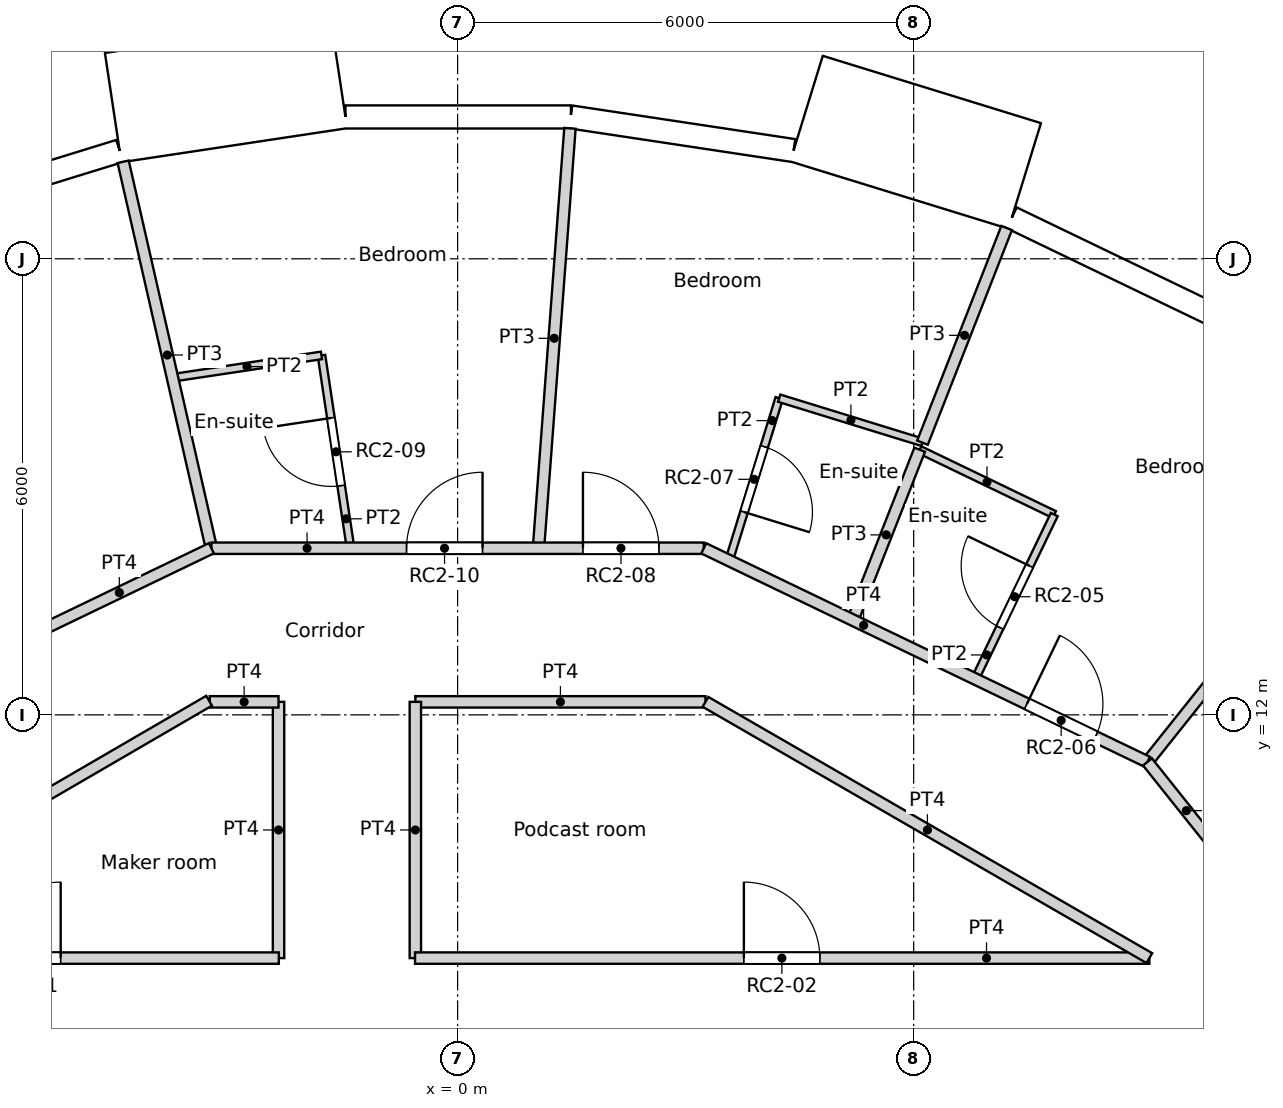
"""IFC4 building model, lengths in metres.
Left out: names, types, materials, properties, quantities, classifications, styles, units other than length and angle.
Written with IfcOpenShell. Run it as: python <this file> out.ifc"""

import sys

from ifc_helpers import new_model, si_unit, direction, frame, frame_2d, origin, origin_2d, place, context, subcontext, project, spatial, rectangle, circle, extrude, element, fill, save


model = new_model("IFC4")
c1 = context("Model", 3, precision=1e-05, world=origin(), true_north=direction((0.0, 1.0)))
c2 = subcontext(c1, "Body", "Model", "MODEL_VIEW")
j1 = project(units=[si_unit("LENGTHUNIT", "METRE"), si_unit("PLANEANGLEUNIT", "RADIAN")], contexts=[c1])
p1 = place(None, origin())
s1 = spatial("IfcSite", under=j1, at=p1, CompositionType="ELEMENT")
p2 = place(p1, origin())
s2 = spatial("IfcBuilding", under=s1, at=p2, CompositionType="ELEMENT")
p3 = place(p2, frame((0.0, 0.0, 241.8)))
s3 = spatial("IfcBuildingStorey", under=s2, at=p3, CompositionType="ELEMENT", Elevation=241.8)
for number, where, z_axis, x_axis in (
    (1, (6.876, 17.521, 0.0), (0.0, 0.0, 1.0), (1.0, 0.0, 0.0)),
    (2, (1.406, 18.77, 0.0), (0.0, 0.0, 1.0), (1.0, 0.0, 0.0)),
    (3, (-4.188, 18.35, 0.0), (0.0, 0.0, 1.0), (1.0, 0.0, 0.0)),
):
    element("IfcColumn", number, at=place(p3, frame(where, z_axis=z_axis, x_axis=x_axis)), inside=s3, PredefinedType="COLUMN", context=c2, shape_type="SweptSolid", body=[
        extrude(circle(Radius=0.55, at=origin_2d()), origin(), (0.0, 0.0, 1.0), 3.6),
    ])
p4 = place(p3, frame((9.961, 17.253, 0.0), z_axis=(0.0, 0.0, 1.0), x_axis=(-0.90095513435, 0.433912255978, 0.0)))
e4 = element("IfcWall", 4, at=p4, inside=s3, PredefinedType="SOLIDWALL", context=c2, shape_type="SweptSolid", body=[
    extrude(rectangle(XDim=2.962, YDim=0.3, at=frame_2d((1.481, 0.0))), origin(), (0.0, 0.0, 1.0), 3.25),
])
p5 = place(p4, frame((1.481, 0.0, 1.55)))
e5 = element("IfcOpeningElement", 5, at=p5, cuts=e4, PredefinedType="OPENING", context=c2, shape_type="SweptSolid", body=[
    extrude(circle(Radius=0.9, at=origin_2d()), frame((0.0, 0.16, 0.0), z_axis=(0.0, -1.0, 0.0), x_axis=(1.0, 0.0, 0.0)), (0.0, 0.0, 1.0), 0.32),
])
p6 = place(p3, frame((7.458, 19.091, -0.35), z_axis=(0.0, 0.0, 1.0), x_axis=(-0.955571139978, 0.294760574774, 0.0)))
e6 = element("IfcWall", 6, at=p6, inside=s3, PredefinedType="ELEMENTEDWALL", context=c2, shape_type="SweptSolid", body=[
    extrude(rectangle(XDim=3.0, YDim=1.45, at=frame_2d((1.5, 0.0))), origin(), (0.0, 0.0, 1.0), 3.6),
])
p7 = place(p6, frame((1.5, 0.0, 1.9)))
e7 = element("IfcOpeningElement", 7, at=p7, cuts=e6, PredefinedType="OPENING", context=c2, shape_type="SweptSolid", body=[
    extrude(circle(Radius=0.9, at=origin_2d()), frame((0.0, 0.735, 0.0), z_axis=(0.0, -1.0, 0.0), x_axis=(1.0, 0.0, 0.0)), (0.0, 0.0, 1.0), 1.47),
])
p8 = place(p3, frame((4.418, 19.425, 0.0), z_axis=(0.0, 0.0, 1.0), x_axis=(-0.988835775663, 0.149009425104, 0.0)))
e8 = element("IfcWall", 8, at=p8, inside=s3, PredefinedType="SOLIDWALL", context=c2, shape_type="SweptSolid", body=[
    extrude(rectangle(XDim=2.962, YDim=0.3, at=frame_2d((1.481, 0.0))), origin(), (0.0, 0.0, 1.0), 3.25),
])
p9 = place(p8, frame((1.481, 0.0, 1.55)))
e9 = element("IfcOpeningElement", 9, at=p9, cuts=e8, PredefinedType="OPENING", context=c2, shape_type="SweptSolid", body=[
    extrude(circle(Radius=0.9, at=origin_2d()), frame((0.0, 0.16, 0.0), z_axis=(0.0, -1.0, 0.0), x_axis=(1.0, 0.0, 0.0)), (0.0, 0.0, 1.0), 0.32),
])
p10 = place(p3, frame((1.489, 19.866, 0.0), z_axis=(0.0, 0.0, 1.0), x_axis=(-1.0, 0.0, 0.0)))
e10 = element("IfcWall", 10, at=p10, inside=s3, PredefinedType="SOLIDWALL", context=c2, shape_type="SweptSolid", body=[
    extrude(rectangle(XDim=2.962, YDim=0.3, at=frame_2d((1.481, 0.0))), origin(), (0.0, 0.0, 1.0), 3.25),
])
p11 = place(p10, frame((1.481, 0.0, 1.55)))
e11 = element("IfcOpeningElement", 11, at=p11, cuts=e10, PredefinedType="OPENING", context=c2, shape_type="SweptSolid", body=[
    extrude(circle(Radius=0.9, at=origin_2d()), frame((0.0, 0.16, 0.0), z_axis=(0.0, -1.0, 0.0), x_axis=(1.0, 0.0, 0.0)), (0.0, 0.0, 1.0), 0.32),
])
p12 = place(p3, frame((-1.563, 20.436, -0.35), z_axis=(0.0, 0.0, 1.0), x_axis=(-0.988836445254, -0.149004981587, 0.0)))
e12 = element("IfcWall", 12, at=p12, inside=s3, PredefinedType="ELEMENTEDWALL", context=c2, shape_type="SweptSolid", body=[
    extrude(rectangle(XDim=3.0, YDim=1.45, at=frame_2d((1.5, 0.0))), origin(), (0.0, 0.0, 1.0), 3.6),
])
p13 = place(p12, frame((1.5, 0.0, 1.9)))
e13 = element("IfcOpeningElement", 13, at=p13, cuts=e12, PredefinedType="OPENING", context=c2, shape_type="SweptSolid", body=[
    extrude(circle(Radius=0.9, at=origin_2d()), frame((0.0, 0.735, 0.0), z_axis=(0.0, -1.0, 0.0), x_axis=(1.0, 0.0, 0.0)), (0.0, 0.0, 1.0), 1.47),
])
p14 = place(p3, frame((-4.448, 19.418, 0.0), z_axis=(0.0, 0.0, 1.0), x_axis=(-0.95558635705, -0.294711238707, 0.0)))
e14 = element("IfcWall", 14, at=p14, inside=s3, PredefinedType="SOLIDWALL", context=c2, shape_type="SweptSolid", body=[
    extrude(rectangle(XDim=2.962, YDim=0.3, at=frame_2d((1.481, 0.0))), origin(), (0.0, 0.0, 1.0), 3.25),
])
p15 = place(p14, frame((1.481, 0.0, 1.55)))
e15 = element("IfcOpeningElement", 15, at=p15, cuts=e14, PredefinedType="OPENING", context=c2, shape_type="SweptSolid", body=[
    extrude(circle(Radius=0.9, at=origin_2d()), frame((0.0, 0.16, 0.0), z_axis=(0.0, -1.0, 0.0), x_axis=(1.0, 0.0, 0.0)), (0.0, 0.0, 1.0), 0.32),
])
p16 = place(p3, frame((-9.092, 8.8, 0.0), z_axis=(0.0, 0.0, 1.0), x_axis=(0.864470922103, 0.502682827277, 0.0)))
e16 = element("IfcWall", 16, at=p16, inside=s3, PredefinedType="PARTITIONING", context=c2, shape_type="SweptSolid", body=[
    extrude(rectangle(XDim=6.735, YDim=0.15, at=frame_2d((3.368, 0.0))), origin(), (0.0, 0.0, 1.0), 3.25),
])
p17 = place(p3, frame((-9.092, 8.8, 0.0), z_axis=(0.0, 0.0, 1.0), x_axis=(1.0, 0.0, 0.0)))
e17 = element("IfcWall", 17, at=p17, inside=s3, PredefinedType="PARTITIONING", context=c2, shape_type="SweptSolid", body=[
    extrude(rectangle(XDim=6.74, YDim=0.15, at=frame_2d((3.37, 0.0))), origin(), (0.0, 0.0, 1.0), 3.25),
])
p18 = place(p17, frame((2.87, 0.0, 0.0)))
e18 = element("IfcOpeningElement", 18, at=p18, cuts=e17, PredefinedType="OPENING", context=c2, shape_type="SweptSolid", body=[
    extrude(rectangle(XDim=1.0, YDim=2.04, at=frame_2d((0.5, 1.02))), frame((0.0, 0.075, 0.0), z_axis=(0.0, -1.0, 0.0), x_axis=(1.0, 0.0, 0.0)), (0.0, 0.0, 1.0), 0.15),
])
p19 = place(p3, frame((-0.56, 8.8, 0.0), z_axis=(0.0, 0.0, 1.0), x_axis=(1.0, 0.0, 0.0)))
e19 = element("IfcWall", 19, at=p19, inside=s3, PredefinedType="PARTITIONING", context=c2, shape_type="SweptSolid", body=[
    extrude(rectangle(XDim=9.661, YDim=0.15, at=frame_2d((4.83, 0.0))), origin(), (0.0, 0.0, 1.0), 3.25),
])
p20 = place(p19, frame((4.326, 0.0, 0.0)))
e20 = element("IfcOpeningElement", 20, at=p20, cuts=e19, PredefinedType="OPENING", context=c2, shape_type="SweptSolid", body=[
    extrude(rectangle(XDim=1.0, YDim=2.04, at=frame_2d((0.5, 1.02))), frame((0.0, 0.075, 0.0), z_axis=(0.0, -1.0, 0.0), x_axis=(1.0, 0.0, 0.0)), (0.0, 0.0, 1.0), 0.15),
])
p21 = place(p3, frame((-2.356, 8.8, 0.0), z_axis=(0.0, 0.0, 1.0), x_axis=(0.0, 1.0, 0.0)))
e21 = element("IfcWall", 21, at=p21, inside=s3, PredefinedType="PARTITIONING", context=c2, shape_type="SweptSolid", body=[
    extrude(rectangle(XDim=3.371, YDim=0.15, at=frame_2d((1.686, 0.0))), origin(), (0.0, 0.0, 1.0), 3.25),
])
p22 = place(p3, frame((-3.261, 12.171, 0.0), z_axis=(0.0, 0.0, 1.0), x_axis=(1.0, 0.0, 0.0)))
e22 = element("IfcWall", 22, at=p22, inside=s3, PredefinedType="PARTITIONING", context=c2, shape_type="SweptSolid", body=[
    extrude(rectangle(XDim=0.905, YDim=0.15, at=frame_2d((0.453, 0.0))), origin(), (0.0, 0.0, 1.0), 3.25),
])
p23 = place(p3, frame((3.261, 12.171, 0.0), z_axis=(0.0, 0.0, 1.0), x_axis=(0.866066809554, -0.499928276245, 0.0)))
e23 = element("IfcWall", 23, at=p23, inside=s3, PredefinedType="PARTITIONING", context=c2, shape_type="SweptSolid", body=[
    extrude(rectangle(XDim=6.743, YDim=0.15, at=frame_2d((3.371, 0.0))), origin(), (0.0, 0.0, 1.0), 3.25),
])
p24 = place(p3, frame((-0.556, 12.171, 0.0), z_axis=(0.0, 0.0, 1.0), x_axis=(1.0, 0.0, 0.0)))
e24 = element("IfcWall", 24, at=p24, inside=s3, PredefinedType="PARTITIONING", context=c2, shape_type="SweptSolid", body=[
    extrude(rectangle(XDim=3.817, YDim=0.15, at=frame_2d((1.908, 0.0))), origin(), (0.0, 0.0, 1.0), 3.25),
])
p25 = place(p3, frame((-0.556, 8.8, 0.0), z_axis=(0.0, 0.0, 1.0), x_axis=(0.0, 1.0, 0.0)))
e25 = element("IfcWall", 25, at=p25, inside=s3, PredefinedType="PARTITIONING", context=c2, shape_type="SweptSolid", body=[
    extrude(rectangle(XDim=3.371, YDim=0.15, at=frame_2d((1.686, 0.0))), origin(), (0.0, 0.0, 1.0), 3.25),
])
p26 = place(p3, frame((9.076, 11.381, 0.0), z_axis=(0.0, 0.0, 1.0), x_axis=(0.623805208652, -0.781579849829, 0.0)))
e26 = element("IfcWall", 26, at=p26, inside=s3, PredefinedType="PARTITIONING", context=c2, shape_type="SweptSolid", body=[
    extrude(rectangle(XDim=1.64, YDim=0.15, at=frame_2d((0.82, 0.0))), origin(), (0.0, 0.0, 1.0), 3.25),
])
p27 = place(p3, frame((3.238, 14.191, 0.0), z_axis=(0.0, 0.0, 1.0), x_axis=(0.901070942113, -0.433671716024, 0.0)))
e27 = element("IfcWall", 27, at=p27, inside=s3, PredefinedType="PARTITIONING", context=c2, shape_type="SweptSolid", body=[
    extrude(rectangle(XDim=6.479, YDim=0.15, at=frame_2d((3.239, 0.0))), origin(), (0.0, 0.0, 1.0), 3.25),
])
p28 = place(p27, frame((4.718, 0.0, 0.0)))
e28 = element("IfcOpeningElement", 28, at=p28, cuts=e27, PredefinedType="OPENING", context=c2, shape_type="SweptSolid", body=[
    extrude(rectangle(XDim=1.0, YDim=2.1, at=frame_2d((0.5, 1.05))), frame((0.0, 0.075, 0.0), z_axis=(0.0, -1.0, 0.0), x_axis=(1.0, 0.0, 0.0)), (0.0, 0.0, 1.0), 0.15),
])
p29 = place(p3, frame((-3.239, 14.192, 0.0), z_axis=(0.0, 0.0, 1.0), x_axis=(1.0, 0.0, 0.0)))
e29 = element("IfcWall", 29, at=p29, inside=s3, PredefinedType="PARTITIONING", context=c2, shape_type="SweptSolid", body=[
    extrude(rectangle(XDim=6.478, YDim=0.15, at=frame_2d((3.239, 0.0))), origin(), (0.0, 0.0, 1.0), 3.25),
])
p30 = place(p29, frame((4.888, 0.0, 0.0)))
e30 = element("IfcOpeningElement", 30, at=p30, cuts=e29, PredefinedType="OPENING", context=c2, shape_type="SweptSolid", body=[
    extrude(rectangle(XDim=1.0, YDim=2.1, at=frame_2d((0.5, 1.05))), frame((0.0, 0.075, 0.0), z_axis=(0.0, -1.0, 0.0), x_axis=(1.0, 0.0, 0.0)), (0.0, 0.0, 1.0), 0.15),
])
p31 = place(p29, frame((2.567, 0.0, 0.0)))
e31 = element("IfcOpeningElement", 31, at=p31, cuts=e29, PredefinedType="OPENING", context=c2, shape_type="SweptSolid", body=[
    extrude(rectangle(XDim=1.0, YDim=2.1, at=frame_2d((0.5, 1.05))), frame((0.0, 0.075, 0.0), z_axis=(0.0, -1.0, 0.0), x_axis=(1.0, 0.0, 0.0)), (0.0, 0.0, 1.0), 0.15),
])
p32 = place(p3, frame((-9.076, 11.381, 0.0), z_axis=(0.0, 0.0, 1.0), x_axis=(0.900976027191, 0.433868872388, 0.0)))
e32 = element("IfcWall", 32, at=p32, inside=s3, PredefinedType="PARTITIONING", context=c2, shape_type="SweptSolid", body=[
    extrude(rectangle(XDim=6.479, YDim=0.15, at=frame_2d((3.239, 0.0))), origin(), (0.0, 0.0, 1.0), 3.25),
])
p33 = place(p32, frame((2.739, 0.0, 0.0)))
e33 = element("IfcOpeningElement", 33, at=p33, cuts=e32, PredefinedType="OPENING", context=c2, shape_type="SweptSolid", body=[
    extrude(rectangle(XDim=1.0, YDim=2.04, at=frame_2d((0.5, 1.02))), frame((0.0, 0.075, 0.0), z_axis=(0.0, -1.0, 0.0), x_axis=(1.0, 0.0, 0.0)), (0.0, 0.0, 1.0), 0.15),
])
p34 = place(p3, frame((9.076, 11.381, 0.0), z_axis=(0.0, 0.0, 1.0), x_axis=(0.623460949534, 0.781854490558, 0.0)))
e34 = element("IfcWall", 34, at=p34, inside=s3, PredefinedType="PARTITIONING", context=c2, shape_type="SweptSolid", body=[
    extrude(rectangle(XDim=5.214, YDim=0.15, at=frame_2d((2.607, 0.0))), origin(), (0.0, 0.0, 1.0), 3.25),
])
p35 = place(p3, frame((6.809, 12.473, 0.0), z_axis=(0.0, 0.0, 1.0), x_axis=(0.433815618773, 0.901001669759, 0.0)))
e35 = element("IfcWall", 35, at=p35, inside=s3, PredefinedType="PARTITIONING", context=c2, shape_type="SweptSolid", body=[
    extrude(rectangle(XDim=2.4, YDim=0.1, at=frame_2d((1.2, 0.0))), origin(), (0.0, 0.0, 1.0), 3.25),
])
p36 = place(p35, frame((0.75, 0.0, 0.0)))
e36 = element("IfcOpeningElement", 36, at=p36, cuts=e35, PredefinedType="OPENING", context=c2, shape_type="SweptSolid", body=[
    extrude(rectangle(XDim=0.9, YDim=2.04, at=frame_2d((0.45, 1.02))), frame((0.0, 0.05, 0.0), z_axis=(0.0, -1.0, 0.0), x_axis=(1.0, 0.0, 0.0)), (0.0, 0.0, 1.0), 0.1),
])
p37 = place(p3, frame((6.079, 15.488, 0.0), z_axis=(0.0, 0.0, 1.0), x_axis=(0.900936932599, -0.433950047216, 0.0)))
e37 = element("IfcWall", 37, at=p37, inside=s3, PredefinedType="PARTITIONING", context=c2, shape_type="SweptSolid", body=[
    extrude(rectangle(XDim=1.966, YDim=0.1, at=frame_2d((0.983, 0.0))), origin(), (0.0, 0.0, 1.0), 3.25),
])
p38 = place(p3, frame((6.116, 15.581, 0.0), z_axis=(0.0, 0.0, 1.0), x_axis=(0.364942529397, 0.931030047978, 0.0)))
e38 = element("IfcWall", 38, at=p38, inside=s3, PredefinedType="PARTITIONING", context=c2, shape_type="SweptSolid", body=[
    extrude(rectangle(XDim=3.033, YDim=0.15, at=frame_2d((1.517, 0.0))), origin(), (0.0, 0.0, 1.0), 3.25),
])
p39 = place(p3, frame((5.199, 13.248, 0.0), z_axis=(0.0, 0.0, 1.0), x_axis=(0.365699450144, 0.930732997247, 0.0)))
e39 = element("IfcWall", 39, at=p39, inside=s3, PredefinedType="PARTITIONING", context=c2, shape_type="SweptSolid", body=[
    extrude(rectangle(XDim=2.407, YDim=0.15, at=frame_2d((1.203, 0.0))), origin(), (0.0, 0.0, 1.0), 3.25),
])
p40 = place(p3, frame((4.231, 16.166, 0.0), z_axis=(0.0, 0.0, 1.0), x_axis=(0.955671951668, -0.294433559219, 0.0)))
e40 = element("IfcWall", 40, at=p40, inside=s3, PredefinedType="PARTITIONING", context=c2, shape_type="SweptSolid", body=[
    extrude(rectangle(XDim=1.973, YDim=0.1, at=frame_2d((0.987, 0.0))), origin(), (0.0, 0.0, 1.0), 3.25),
])
p41 = place(p3, frame((3.572, 14.032, 0.0), z_axis=(0.0, 0.0, 1.0), x_axis=(0.295030507093, 0.955487833457, 0.0)))
e41 = element("IfcWall", 41, at=p41, inside=s3, PredefinedType="PARTITIONING", context=c2, shape_type="SweptSolid", body=[
    extrude(rectangle(XDim=2.233, YDim=0.1, at=frame_2d((1.117, 0.0))), origin(), (0.0, 0.0, 1.0), 3.25),
])
p42 = place(p41, frame((0.667, 0.0, 0.0)))
e42 = element("IfcOpeningElement", 42, at=p42, cuts=e41, PredefinedType="OPENING", context=c2, shape_type="SweptSolid", body=[
    extrude(rectangle(XDim=0.9, YDim=2.04, at=frame_2d((0.45, 1.02))), frame((0.0, 0.05, 0.0), z_axis=(0.0, -1.0, 0.0), x_axis=(1.0, 0.0, 0.0)), (0.0, 0.0, 1.0), 0.1),
])
p43 = place(p3, frame((1.064, 14.192, 0.0), z_axis=(0.0, 0.0, 1.0), x_axis=(0.074745027699, 0.997202677912, 0.0)))
e43 = element("IfcWall", 43, at=p43, inside=s3, PredefinedType="PARTITIONING", context=c2, shape_type="SweptSolid", body=[
    extrude(rectangle(XDim=5.54, YDim=0.15, at=frame_2d((2.77, 0.0))), origin(), (0.0, 0.0, 1.0), 3.25),
])
p44 = place(p3, frame((-1.791, 16.729, 0.0), z_axis=(0.0, 0.0, 1.0), x_axis=(0.149289553133, -0.988793522089, 0.0)))
e44 = element("IfcWall", 44, at=p44, inside=s3, PredefinedType="PARTITIONING", context=c2, shape_type="SweptSolid", body=[
    extrude(rectangle(XDim=2.566, YDim=0.1, at=frame_2d((1.283, 0.0))), origin(), (0.0, 0.0, 1.0), 3.25),
])
p45 = place(p44, frame((0.833, 0.0, 0.0)))
e45 = element("IfcOpeningElement", 45, at=p45, cuts=e44, PredefinedType="OPENING", context=c2, shape_type="SweptSolid", body=[
    extrude(rectangle(XDim=0.9, YDim=2.04, at=frame_2d((0.45, 1.02))), frame((0.0, 0.05, 0.0), z_axis=(0.0, -1.0, 0.0), x_axis=(1.0, 0.0, 0.0)), (0.0, 0.0, 1.0), 0.1),
])
p46 = place(p3, frame((-3.751, 16.434, 0.0), z_axis=(0.0, 0.0, 1.0), x_axis=(0.988867580828, 0.148798210967, 0.0)))
e46 = element("IfcWall", 46, at=p46, inside=s3, PredefinedType="PARTITIONING", context=c2, shape_type="SweptSolid", body=[
    extrude(rectangle(XDim=1.982, YDim=0.1, at=frame_2d((0.991, 0.0))), origin(), (0.0, 0.0, 1.0), 3.25),
])
p47 = place(p3, frame((-4.4, 19.276, 0.0), z_axis=(0.0, 0.0, 1.0), x_axis=(0.222612505682, -0.974907007008, 0.0)))
e47 = element("IfcWall", 47, at=p47, inside=s3, PredefinedType="PARTITIONING", context=c2, shape_type="SweptSolid", body=[
    extrude(rectangle(XDim=5.215, YDim=0.15, at=frame_2d((2.607, 0.0))), origin(), (0.0, 0.0, 1.0), 3.25),
])
p48 = place(p5, origin())
e48 = element("IfcWindow", 48, at=p48, inside=s3, PartitioningType="SINGLE_PANEL", PredefinedType="WINDOW", context=c2, shape_type="SweptSolid", body=[
    extrude(circle(Radius=0.9, at=origin_2d()), frame((0.0, 0.12, 0.0), z_axis=(0.0, -1.0, 0.0), x_axis=(1.0, 0.0, 0.0)), (0.0, 0.0, 1.0), 0.1),
])
fill(e5, e48)
p49 = place(p7, origin())
e49 = element("IfcWindow", 49, at=p49, inside=s3, PartitioningType="SINGLE_PANEL", PredefinedType="WINDOW", context=c2, shape_type="SweptSolid", body=[
    extrude(circle(Radius=0.9, at=origin_2d()), frame((0.0, 0.695, 0.0), z_axis=(0.0, -1.0, 0.0), x_axis=(1.0, 0.0, 0.0)), (0.0, 0.0, 1.0), 0.1),
])
fill(e7, e49)
p50 = place(p9, origin())
e50 = element("IfcWindow", 50, at=p50, inside=s3, PartitioningType="SINGLE_PANEL", PredefinedType="WINDOW", context=c2, shape_type="SweptSolid", body=[
    extrude(circle(Radius=0.9, at=origin_2d()), frame((0.0, 0.12, 0.0), z_axis=(0.0, -1.0, 0.0), x_axis=(1.0, 0.0, 0.0)), (0.0, 0.0, 1.0), 0.1),
])
fill(e9, e50)
p51 = place(p11, origin())
e51 = element("IfcWindow", 51, at=p51, inside=s3, PartitioningType="SINGLE_PANEL", PredefinedType="WINDOW", context=c2, shape_type="SweptSolid", body=[
    extrude(circle(Radius=0.9, at=origin_2d()), frame((0.0, 0.12, 0.0), z_axis=(0.0, -1.0, 0.0), x_axis=(1.0, 0.0, 0.0)), (0.0, 0.0, 1.0), 0.1),
])
fill(e11, e51)
p52 = place(p13, origin())
e52 = element("IfcWindow", 52, at=p52, inside=s3, PartitioningType="SINGLE_PANEL", PredefinedType="WINDOW", context=c2, shape_type="SweptSolid", body=[
    extrude(circle(Radius=0.9, at=origin_2d()), frame((0.0, 0.695, 0.0), z_axis=(0.0, -1.0, 0.0), x_axis=(1.0, 0.0, 0.0)), (0.0, 0.0, 1.0), 0.1),
])
fill(e13, e52)
p53 = place(p15, origin())
e53 = element("IfcWindow", 53, at=p53, inside=s3, PartitioningType="SINGLE_PANEL", PredefinedType="WINDOW", context=c2, shape_type="SweptSolid", body=[
    extrude(circle(Radius=0.9, at=origin_2d()), frame((0.0, 0.12, 0.0), z_axis=(0.0, -1.0, 0.0), x_axis=(1.0, 0.0, 0.0)), (0.0, 0.0, 1.0), 0.1),
])
fill(e15, e53)
p54 = place(p18, origin())
e54 = element("IfcDoor", 54, at=p54, inside=s3, OperationType="SINGLE_SWING_RIGHT", PredefinedType="DOOR", context=c2, shape_type="SweptSolid", body=[
    extrude(rectangle(XDim=1.0, YDim=2.04, at=frame_2d((0.5, 1.02))), frame((0.0, 0.025, 0.0), z_axis=(0.0, -1.0, 0.0), x_axis=(1.0, 0.0, 0.0)), (0.0, 0.0, 1.0), 0.05),
])
fill(e18, e54)
p55 = place(p20, origin())
e55 = element("IfcDoor", 55, at=p55, inside=s3, OperationType="SINGLE_SWING_LEFT", PredefinedType="DOOR", context=c2, shape_type="SweptSolid", body=[
    extrude(rectangle(XDim=1.0, YDim=2.04, at=frame_2d((0.5, 1.02))), frame((0.0, 0.025, 0.0), z_axis=(0.0, -1.0, 0.0), x_axis=(1.0, 0.0, 0.0)), (0.0, 0.0, 1.0), 0.05),
])
fill(e20, e55)
p56 = place(p36, origin())
e56 = element("IfcDoor", 56, at=p56, inside=s3, OperationType="SINGLE_SWING_RIGHT", PredefinedType="DOOR", context=c2, shape_type="SweptSolid", body=[
    extrude(rectangle(XDim=0.9, YDim=2.04, at=frame_2d((0.45, 1.02))), frame((0.0, 0.025, 0.0), z_axis=(0.0, -1.0, 0.0), x_axis=(1.0, 0.0, 0.0)), (0.0, 0.0, 1.0), 0.05),
])
fill(e36, e56)
p57 = place(p28, origin())
e57 = element("IfcDoor", 57, at=p57, inside=s3, OperationType="SINGLE_SWING_LEFT", PredefinedType="DOOR", context=c2, shape_type="SweptSolid", body=[
    extrude(rectangle(XDim=1.0, YDim=2.1, at=frame_2d((0.5, 1.05))), frame((0.0, 0.025, 0.0), z_axis=(0.0, -1.0, 0.0), x_axis=(1.0, 0.0, 0.0)), (0.0, 0.0, 1.0), 0.05),
])
fill(e28, e57)
p58 = place(p42, origin())
e58 = element("IfcDoor", 58, at=p58, inside=s3, OperationType="SINGLE_SWING_RIGHT", PredefinedType="DOOR", context=c2, shape_type="SweptSolid", body=[
    extrude(rectangle(XDim=0.9, YDim=2.04, at=frame_2d((0.45, 1.02))), frame((0.0, 0.025, 0.0), z_axis=(0.0, -1.0, 0.0), x_axis=(1.0, 0.0, 0.0)), (0.0, 0.0, 1.0), 0.05),
])
fill(e42, e58)
p59 = place(p30, origin())
e59 = element("IfcDoor", 59, at=p59, inside=s3, OperationType="SINGLE_SWING_LEFT", PredefinedType="DOOR", context=c2, shape_type="SweptSolid", body=[
    extrude(rectangle(XDim=1.0, YDim=2.1, at=frame_2d((0.5, 1.05))), frame((0.0, 0.025, 0.0), z_axis=(0.0, -1.0, 0.0), x_axis=(1.0, 0.0, 0.0)), (0.0, 0.0, 1.0), 0.05),
])
fill(e30, e59)
p60 = place(p45, origin())
e60 = element("IfcDoor", 60, at=p60, inside=s3, OperationType="SINGLE_SWING_RIGHT", PredefinedType="DOOR", context=c2, shape_type="SweptSolid", body=[
    extrude(rectangle(XDim=0.9, YDim=2.04, at=frame_2d((0.45, 1.02))), frame((0.0, 0.025, 0.0), z_axis=(0.0, -1.0, 0.0), x_axis=(1.0, 0.0, 0.0)), (0.0, 0.0, 1.0), 0.05),
])
fill(e45, e60)
p61 = place(p31, origin())
e61 = element("IfcDoor", 61, at=p61, inside=s3, OperationType="SINGLE_SWING_RIGHT", PredefinedType="DOOR", context=c2, shape_type="SweptSolid", body=[
    extrude(rectangle(XDim=1.0, YDim=2.1, at=frame_2d((0.5, 1.05))), frame((0.0, 0.025, 0.0), z_axis=(0.0, -1.0, 0.0), x_axis=(1.0, 0.0, 0.0)), (0.0, 0.0, 1.0), 0.05),
])
fill(e31, e61)
save(model, sys.argv[1])
